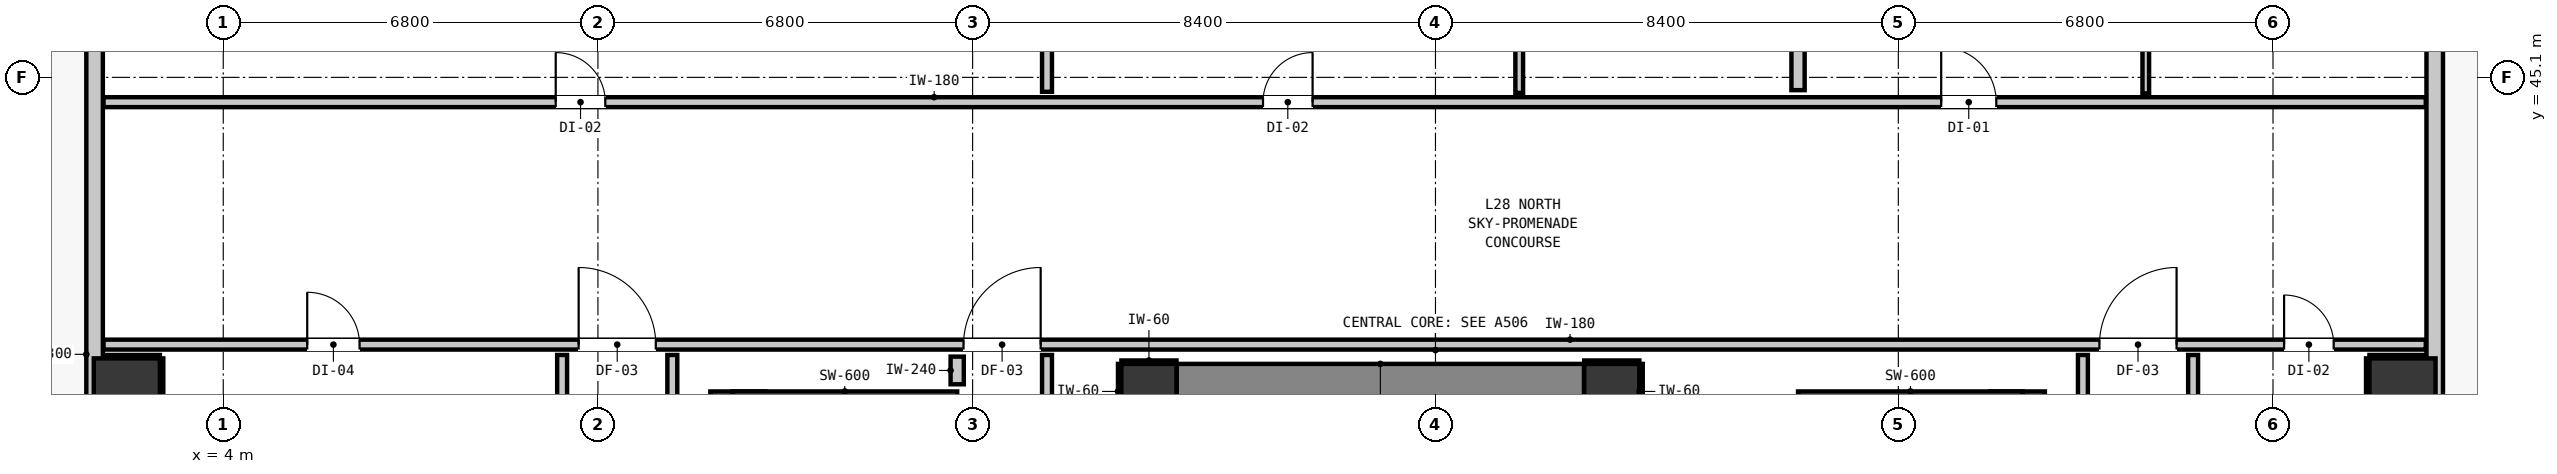
"""IFC4 building model, lengths in metres.
Left out: names, types, materials, properties, quantities, classifications, styles, units other than length and angle.
Written with IfcOpenShell. Run it as: python <this file> out.ifc"""

import sys

from ifc_helpers import new_model, si_unit, direction, frame, frame_2d, origin, origin_2d, place, context, subcontext, project, spatial, rectangle, extrude, element, fill, save


model = new_model("IFC4")
c1 = context("Model", 3, precision=1e-05, world=origin(), true_north=direction((0.0, 1.0)))
c2 = subcontext(c1, "Body", "Model", "MODEL_VIEW")
j1 = project(units=[si_unit("LENGTHUNIT", "METRE"), si_unit("PLANEANGLEUNIT", "RADIAN")], contexts=[c1])
p1 = place(None, origin())
s1 = spatial("IfcSite", under=j1, at=p1, CompositionType="ELEMENT")
p2 = place(p1, origin())
s2 = spatial("IfcBuilding", under=s1, at=p2, CompositionType="ELEMENT")
p3 = place(p2, frame((0.0, 0.0, 99.44)))
s3 = spatial("IfcBuildingStorey", under=s2, at=p3, CompositionType="ELEMENT", Elevation=99.44)
for number, where, z_axis, x_axis in (
    (1, (20.8, 39.4, 0.0), (0.0, 0.0, 1.0), (1.0, 0.0, 0.0)),
    (2, (29.2, 39.4, 0.0), (0.0, 0.0, 1.0), (1.0, 0.0, 0.0)),
):
    element("IfcColumn", number, at=place(p3, frame(where, z_axis=z_axis, x_axis=x_axis)), inside=s3, PredefinedType="COLUMN", context=c2, shape_type="SweptSolid", body=[
        extrude(rectangle(XDim=1.0, YDim=1.0, at=origin_2d()), origin(), (0.0, 0.0, 1.0), 3.32),
    ])
p4 = place(p3, frame((13.34, 31.205, 0.0), z_axis=(0.0, 0.0, 1.0), x_axis=(0.0, 1.0, 0.0)))
e3 = element("IfcWall", 3, at=p4, inside=s3, PredefinedType="SHEAR", context=c2, shape_type="SweptSolid", body=[
    extrude(rectangle(XDim=8.195, YDim=1.0, at=frame_2d((4.097, 0.0))), origin(), (0.0, 0.0, 1.0), 3.32),
])
p5 = place(p3, frame((13.24, 39.1, 0.0), z_axis=(0.0, 0.0, 1.0), x_axis=(1.0, 0.0, 0.0)))
e4 = element("IfcWall", 4, at=p5, inside=s3, PredefinedType="SHEAR", context=c2, shape_type="SweptSolid", body=[
    extrude(rectangle(XDim=4.08, YDim=0.6, at=frame_2d((2.04, 0.0))), origin(), (0.0, 0.0, 1.0), 3.32),
])
p6 = place(p3, frame((36.56, 31.205, 0.0), z_axis=(0.0, 0.0, 1.0), x_axis=(0.0, 1.0, 0.0)))
e5 = element("IfcWall", 5, at=p6, inside=s3, PredefinedType="SHEAR", context=c2, shape_type="SweptSolid", body=[
    extrude(rectangle(XDim=8.195, YDim=1.0, at=frame_2d((4.097, 0.0))), origin(), (0.0, 0.0, 1.0), 3.32),
])
p7 = place(p3, frame((32.58, 39.1, 0.0), z_axis=(0.0, 0.0, 1.0), x_axis=(1.0, 0.0, 0.0)))
e6 = element("IfcWall", 6, at=p7, inside=s3, PredefinedType="SHEAR", context=c2, shape_type="SweptSolid", body=[
    extrude(rectangle(XDim=4.08, YDim=0.6, at=frame_2d((2.04, 0.0))), origin(), (0.0, 0.0, 1.0), 3.32),
])
p8 = place(p3, frame((21.305, 39.4, 0.0), z_axis=(0.0, 0.0, 1.0), x_axis=(1.0, 0.0, 0.0)))
e7 = element("IfcWall", 7, at=p8, inside=s3, PredefinedType="SHEAR", context=c2, shape_type="SweptSolid", body=[
    extrude(rectangle(XDim=7.39, YDim=1.0, at=frame_2d((3.695, 0.0))), origin(), (0.0, 0.0, 1.0), 3.32),
])
for number, where, z_axis, x_axis in (
    (8, (2.25, 39.4, 0.0), (0.0, 0.0, 1.0), (1.0, 0.0, 0.0)),
    (9, (43.55, 39.4, 0.0), (0.0, 0.0, 1.0), (1.0, 0.0, 0.0)),
):
    element("IfcColumn", number, at=place(p3, frame(where, z_axis=z_axis, x_axis=x_axis)), inside=s3, PredefinedType="COLUMN", context=c2, shape_type="SweptSolid", body=[
        extrude(rectangle(XDim=1.2, YDim=1.2, at=origin_2d()), origin(), (0.0, 0.0, 1.0), 3.32),
    ])
p9 = place(p3, frame((1.665, 16.365, 0.0), z_axis=(0.0, 0.0, 1.0), x_axis=(0.0, 1.0, 0.0)))
e10 = element("IfcWall", 10, at=p9, inside=s3, PredefinedType="STANDARD", context=c2, shape_type="SweptSolid", body=[
    extrude(rectangle(XDim=34.67, YDim=0.3, at=frame_2d((17.335, 0.0))), origin(), (0.0, 0.0, 1.0), 3.06),
])
p10 = place(p9, frame((8.955, 0.0, 0.0)))
e11 = element("IfcOpeningElement", 11, at=p10, cuts=e10, PredefinedType="OPENING", context=c2, shape_type="SweptSolid", body=[
    extrude(rectangle(XDim=1.0, YDim=2.15, at=frame_2d((0.5, 1.075))), frame((0.0, 0.16, 0.0), z_axis=(0.0, -1.0, 0.0), x_axis=(1.0, 0.0, 0.0)), (0.0, 0.0, 1.0), 0.32),
])
p11 = place(p9, frame((31.033, 0.0, 0.85)))
e12 = element("IfcOpeningElement", 12, at=p11, cuts=e10, PredefinedType="OPENING", context=c2, shape_type="SweptSolid", body=[
    extrude(rectangle(XDim=0.9, YDim=1.5, at=frame_2d((0.45, 0.75))), frame((0.0, 0.16, 0.0), z_axis=(0.0, -1.0, 0.0), x_axis=(1.0, 0.0, 0.0)), (0.0, 0.0, 1.0), 0.32),
])
p12 = place(p9, frame((10.955, 0.0, 0.85)))
e13 = element("IfcOpeningElement", 13, at=p12, cuts=e10, PredefinedType="OPENING", context=c2, shape_type="SweptSolid", body=[
    extrude(rectangle(XDim=0.9, YDim=1.5, at=frame_2d((0.45, 0.75))), frame((0.0, 0.16, 0.0), z_axis=(0.0, -1.0, 0.0), x_axis=(1.0, 0.0, 0.0)), (0.0, 0.0, 1.0), 0.32),
])
p13 = place(p9, frame((15.485, 0.0, 0.85)))
e14 = element("IfcOpeningElement", 14, at=p13, cuts=e10, PredefinedType="OPENING", context=c2, shape_type="SweptSolid", body=[
    extrude(rectangle(XDim=0.9, YDim=1.5, at=frame_2d((0.45, 0.75))), frame((0.0, 0.16, 0.0), z_axis=(0.0, -1.0, 0.0), x_axis=(1.0, 0.0, 0.0)), (0.0, 0.0, 1.0), 0.32),
])
p14 = place(p3, frame((44.135, 51.035, 0.0), z_axis=(0.0, 0.0, 1.0), x_axis=(0.0, -1.0, 0.0)))
e15 = element("IfcWall", 15, at=p14, inside=s3, PredefinedType="STANDARD", context=c2, shape_type="SweptSolid", body=[
    extrude(rectangle(XDim=34.67, YDim=0.3, at=frame_2d((17.335, 0.0))), origin(), (0.0, 0.0, 1.0), 3.06),
])
p15 = place(p14, frame((0.901, 0.0, 0.0)))
e16 = element("IfcOpeningElement", 16, at=p15, cuts=e15, PredefinedType="OPENING", context=c2, shape_type="SweptSolid", body=[
    extrude(rectangle(XDim=1.0, YDim=2.15, at=frame_2d((0.5, 1.075))), frame((0.0, 0.16, 0.0), z_axis=(0.0, -1.0, 0.0), x_axis=(1.0, 0.0, 0.0)), (0.0, 0.0, 1.0), 0.32),
])
p16 = place(p14, frame((32.682, 0.0, 0.85)))
e17 = element("IfcOpeningElement", 17, at=p16, cuts=e15, PredefinedType="OPENING", context=c2, shape_type="SweptSolid", body=[
    extrude(rectangle(XDim=0.9, YDim=1.5, at=frame_2d((0.45, 0.75))), frame((0.0, 0.16, 0.0), z_axis=(0.0, -1.0, 0.0), x_axis=(1.0, 0.0, 0.0)), (0.0, 0.0, 1.0), 0.32),
])
p17 = place(p14, frame((23.323, 0.0, 0.85)))
e18 = element("IfcOpeningElement", 18, at=p17, cuts=e15, PredefinedType="OPENING", context=c2, shape_type="SweptSolid", body=[
    extrude(rectangle(XDim=0.9, YDim=1.5, at=frame_2d((0.45, 0.75))), frame((0.0, 0.16, 0.0), z_axis=(0.0, -1.0, 0.0), x_axis=(1.0, 0.0, 0.0)), (0.0, 0.0, 1.0), 0.32),
])
p18 = place(p3, frame((1.827, 40.25, 0.0), z_axis=(0.0, 0.0, 1.0), x_axis=(1.0, 0.0, 0.0)))
e19 = element("IfcWall", 19, at=p18, inside=s3, PredefinedType="PARTITIONING", context=c2, shape_type="SweptSolid", body=[
    extrude(rectangle(XDim=42.146, YDim=0.18, at=frame_2d((21.073, 0.0))), origin(), (0.0, 0.0, 1.0), 3.06),
])
p19 = place(p18, frame((15.608, 0.0, 0.0)))
e20 = element("IfcOpeningElement", 20, at=p19, cuts=e19, PredefinedType="OPENING", context=c2, shape_type="SweptSolid", body=[
    extrude(rectangle(XDim=1.4, YDim=2.15, at=frame_2d((0.7, 1.075))), frame((0.0, 0.1, 0.0), z_axis=(0.0, -1.0, 0.0), x_axis=(1.0, 0.0, 0.0)), (0.0, 0.0, 1.0), 0.2),
])
p20 = place(p18, frame((8.623, 0.0, 0.0)))
e21 = element("IfcOpeningElement", 21, at=p20, cuts=e19, PredefinedType="OPENING", context=c2, shape_type="SweptSolid", body=[
    extrude(rectangle(XDim=1.4, YDim=2.15, at=frame_2d((0.7, 1.075))), frame((0.0, 0.1, 0.0), z_axis=(0.0, -1.0, 0.0), x_axis=(1.0, 0.0, 0.0)), (0.0, 0.0, 1.0), 0.2),
])
p21 = place(p18, frame((36.223, 0.0, 0.0)))
e22 = element("IfcOpeningElement", 22, at=p21, cuts=e19, PredefinedType="OPENING", context=c2, shape_type="SweptSolid", body=[
    extrude(rectangle(XDim=1.4, YDim=2.15, at=frame_2d((0.7, 1.075))), frame((0.0, 0.1, 0.0), z_axis=(0.0, -1.0, 0.0), x_axis=(1.0, 0.0, 0.0)), (0.0, 0.0, 1.0), 0.2),
])
p22 = place(p18, frame((3.697, 0.0, 0.0)))
e23 = element("IfcOpeningElement", 23, at=p22, cuts=e19, PredefinedType="OPENING", context=c2, shape_type="SweptSolid", body=[
    extrude(rectangle(XDim=0.95, YDim=2.1, at=frame_2d((0.475, 1.05))), frame((0.0, 0.1, 0.0), z_axis=(0.0, -1.0, 0.0), x_axis=(1.0, 0.0, 0.0)), (0.0, 0.0, 1.0), 0.2),
])
p23 = place(p18, frame((39.574, 0.0, 0.0)))
e24 = element("IfcOpeningElement", 24, at=p23, cuts=e19, PredefinedType="OPENING", context=c2, shape_type="SweptSolid", body=[
    extrude(rectangle(XDim=0.9, YDim=2.1, at=frame_2d((0.45, 1.05))), frame((0.0, 0.1, 0.0), z_axis=(0.0, -1.0, 0.0), x_axis=(1.0, 0.0, 0.0)), (0.0, 0.0, 1.0), 0.2),
])
p24 = place(p3, frame((1.827, 44.65, 0.0), z_axis=(0.0, 0.0, 1.0), x_axis=(1.0, 0.0, 0.0)))
e25 = element("IfcWall", 25, at=p24, inside=s3, PredefinedType="PARTITIONING", context=c2, shape_type="SweptSolid", body=[
    extrude(rectangle(XDim=42.146, YDim=0.18, at=frame_2d((21.073, 0.0))), origin(), (0.0, 0.0, 1.0), 3.06),
])
p25 = place(p24, frame((8.207, 0.0, 0.0)))
e26 = element("IfcOpeningElement", 26, at=p25, cuts=e25, PredefinedType="OPENING", context=c2, shape_type="SweptSolid", body=[
    extrude(rectangle(XDim=0.9, YDim=2.1, at=frame_2d((0.45, 1.05))), frame((0.0, 0.1, 0.0), z_axis=(0.0, -1.0, 0.0), x_axis=(1.0, 0.0, 0.0)), (0.0, 0.0, 1.0), 0.2),
])
p26 = place(p24, frame((21.043, 0.0, 0.0)))
e27 = element("IfcOpeningElement", 27, at=p26, cuts=e25, PredefinedType="OPENING", context=c2, shape_type="SweptSolid", body=[
    extrude(rectangle(XDim=0.9, YDim=2.1, at=frame_2d((0.45, 1.05))), frame((0.0, 0.1, 0.0), z_axis=(0.0, -1.0, 0.0), x_axis=(1.0, 0.0, 0.0)), (0.0, 0.0, 1.0), 0.2),
])
p27 = place(p24, frame((33.351, 0.0, 0.0)))
e28 = element("IfcOpeningElement", 28, at=p27, cuts=e25, PredefinedType="OPENING", context=c2, shape_type="SweptSolid", body=[
    extrude(rectangle(XDim=1.0, YDim=2.15, at=frame_2d((0.5, 1.075))), frame((0.0, 0.1, 0.0), z_axis=(0.0, -1.0, 0.0), x_axis=(1.0, 0.0, 0.0)), (0.0, 0.0, 1.0), 0.2),
])
p28 = place(p3, frame((17.32, 39.53, 0.0), z_axis=(0.0, 0.0, 1.0), x_axis=(0.0, 1.0, 0.0)))
e29 = element("IfcWall", 29, at=p28, inside=s3, PredefinedType="PARTITIONING", context=c2, shape_type="SweptSolid", body=[
    extrude(rectangle(XDim=0.502, YDim=0.24, at=frame_2d((0.251, 0.0))), origin(), (0.0, 0.0, 1.0), 3.06),
])
p29 = place(p3, frame((32.58, 44.868, 0.0), z_axis=(0.0, 0.0, 1.0), x_axis=(0.0, 1.0, 0.0)))
e30 = element("IfcWall", 30, at=p29, inside=s3, PredefinedType="PARTITIONING", context=c2, shape_type="SweptSolid", body=[
    extrude(rectangle(XDim=3.421, YDim=0.24, at=frame_2d((1.71, 0.0))), origin(), (0.0, 0.0, 1.0), 3.06),
])
p30 = place(p29, frame((1.246, 0.0, 0.0)))
e31 = element("IfcOpeningElement", 31, at=p30, cuts=e30, PredefinedType="OPENING", context=c2, shape_type="SweptSolid", body=[
    extrude(rectangle(XDim=0.86, YDim=2.02, at=frame_2d((0.43, 1.01))), frame((0.0, 0.13, 0.0), z_axis=(0.0, -1.0, 0.0), x_axis=(1.0, 0.0, 0.0)), (0.0, 0.0, 1.0), 0.26),
])
p31 = place(p3, frame((10.15, 36.818, 0.0), z_axis=(0.0, 0.0, 1.0), x_axis=(0.0, 1.0, 0.0)))
e32 = element("IfcWall", 32, at=p31, inside=s3, PredefinedType="PARTITIONING", context=c2, shape_type="SweptSolid", body=[
    extrude(rectangle(XDim=3.244, YDim=0.18, at=frame_2d((1.622, 0.0))), origin(), (0.0, 0.0, 1.0), 3.06),
])
p32 = place(p3, frame((12.15, 21.368, 0.0), z_axis=(0.0, 0.0, 1.0), x_axis=(0.0, 1.0, 0.0)))
e33 = element("IfcWall", 33, at=p32, inside=s3, PredefinedType="PARTITIONING", context=c2, shape_type="SweptSolid", body=[
    extrude(rectangle(XDim=18.694, YDim=0.18, at=frame_2d((9.347, 0.0))), origin(), (0.0, 0.0, 1.0), 3.06),
])
p33 = place(p3, frame((18.95, 39.058, 0.0), z_axis=(0.0, 0.0, 1.0), x_axis=(0.0, 1.0, 0.0)))
e34 = element("IfcWall", 34, at=p33, inside=s3, PredefinedType="PARTITIONING", context=c2, shape_type="SweptSolid", body=[
    extrude(rectangle(XDim=1.004, YDim=0.18, at=frame_2d((0.502, 0.0))), origin(), (0.0, 0.0, 1.0), 3.06),
])
p34 = place(p3, frame((18.95, 44.838, 0.0), z_axis=(0.0, 0.0, 1.0), x_axis=(0.0, 1.0, 0.0)))
e35 = element("IfcWall", 35, at=p34, inside=s3, PredefinedType="PARTITIONING", context=c2, shape_type="SweptSolid", body=[
    extrude(rectangle(XDim=8.535, YDim=0.18, at=frame_2d((4.268, 0.0))), origin(), (0.0, 0.0, 1.0), 3.06),
])
p35 = place(p3, frame((37.75, 21.368, 0.0), z_axis=(0.0, 0.0, 1.0), x_axis=(0.0, 1.0, 0.0)))
e36 = element("IfcWall", 36, at=p35, inside=s3, PredefinedType="PARTITIONING", context=c2, shape_type="SweptSolid", body=[
    extrude(rectangle(XDim=18.694, YDim=0.18, at=frame_2d((9.347, 0.0))), origin(), (0.0, 0.0, 1.0), 3.06),
])
p36 = place(p3, frame((39.75, 34.158, 0.0), z_axis=(0.0, 0.0, 1.0), x_axis=(0.0, 1.0, 0.0)))
e37 = element("IfcWall", 37, at=p36, inside=s3, PredefinedType="PARTITIONING", context=c2, shape_type="SweptSolid", body=[
    extrude(rectangle(XDim=5.904, YDim=0.18, at=frame_2d((2.952, 0.0))), origin(), (0.0, 0.0, 1.0), 3.06),
])
p37 = place(p3, frame((27.52, 44.818, 0.0), z_axis=(0.0, 0.0, 1.0), x_axis=(0.0, 1.0, 0.0)))
e38 = element("IfcWall", 38, at=p37, inside=s3, PredefinedType="PARTITIONING", context=c2, shape_type="SweptSolid", body=[
    extrude(rectangle(XDim=3.447, YDim=0.14, at=frame_2d((1.723, 0.0))), origin(), (0.0, 0.0, 1.0), 3.06),
])
p38 = place(p3, frame((38.891, 44.808, 0.0), z_axis=(0.0, 0.0, 1.0), x_axis=(0.0, 1.0, 0.0)))
e39 = element("IfcWall", 39, at=p38, inside=s3, PredefinedType="PARTITIONING", context=c2, shape_type="SweptSolid", body=[
    extrude(rectangle(XDim=3.467, YDim=0.12, at=frame_2d((1.733, 0.0))), origin(), (0.0, 0.0, 1.0), 2.445),
])
p39 = place(p38, frame((1.286, 0.0, 0.0)))
e40 = element("IfcOpeningElement", 40, at=p39, cuts=e39, PredefinedType="OPENING", context=c2, shape_type="SweptSolid", body=[
    extrude(rectangle(XDim=0.9, YDim=2.1, at=frame_2d((0.45, 1.05))), frame((0.0, 0.07, 0.0), z_axis=(0.0, -1.0, 0.0), x_axis=(1.0, 0.0, 0.0)), (0.0, 0.0, 1.0), 0.14),
])
for number, where, z_axis, x_axis in (
    (41, (20.3, 39.932, 0.0), (0.0, 0.0, 1.0), (1.0, 0.0, 0.0)),
    (42, (20.268, 38.9, 0.0), (0.0, 0.0, 1.0), (0.0, 1.0, 0.0)),
    (43, (28.7, 39.932, 0.0), (0.0, 0.0, 1.0), (1.0, 0.0, 0.0)),
    (44, (29.732, 38.9, 0.0), (0.0, 0.0, 1.0), (0.0, 1.0, 0.0)),
):
    element("IfcWall", number, at=place(p3, frame(where, z_axis=z_axis, x_axis=x_axis)), inside=s3, PredefinedType="PARTITIONING", context=c2, shape_type="SweptSolid", body=[
        extrude(rectangle(XDim=1.0, YDim=0.06, at=frame_2d((0.5, 0.0))), origin(), (0.0, 0.0, 1.0), 1.45),
    ])
p40 = place(p3, frame((1.83, 40.032, 0.0), z_axis=(0.0, 0.0, 1.0), x_axis=(1.0, 0.0, 0.0)))
e45 = element("IfcWall", 45, at=p40, inside=s3, PredefinedType="PARTITIONING", context=c2, shape_type="SweptSolid", body=[
    extrude(rectangle(XDim=1.02, YDim=0.06, at=frame_2d((0.51, 0.0))), origin(), (0.0, 0.0, 1.0), 1.45),
])
p41 = place(p3, frame((2.882, 38.8, 0.0), z_axis=(0.0, 0.0, 1.0), x_axis=(0.0, 1.0, 0.0)))
e46 = element("IfcWall", 46, at=p41, inside=s3, PredefinedType="PARTITIONING", context=c2, shape_type="SweptSolid", body=[
    extrude(rectangle(XDim=1.2, YDim=0.06, at=frame_2d((0.6, 0.0))), origin(), (0.0, 0.0, 1.0), 1.45),
])
p42 = place(p3, frame((42.95, 40.032, 0.0), z_axis=(0.0, 0.0, 1.0), x_axis=(1.0, 0.0, 0.0)))
e47 = element("IfcWall", 47, at=p42, inside=s3, PredefinedType="PARTITIONING", context=c2, shape_type="SweptSolid", body=[
    extrude(rectangle(XDim=1.02, YDim=0.06, at=frame_2d((0.51, 0.0))), origin(), (0.0, 0.0, 1.0), 1.45),
])
p43 = place(p3, frame((42.918, 38.8, 0.0), z_axis=(0.0, 0.0, 1.0), x_axis=(0.0, 1.0, 0.0)))
e48 = element("IfcWall", 48, at=p43, inside=s3, PredefinedType="PARTITIONING", context=c2, shape_type="SweptSolid", body=[
    extrude(rectangle(XDim=1.2, YDim=0.06, at=frame_2d((0.6, 0.0))), origin(), (0.0, 0.0, 1.0), 1.45),
])
p44 = place(p19, origin())
e49 = element("IfcDoor", 49, at=p44, inside=s3, OperationType="SINGLE_SWING_RIGHT", PredefinedType="DOOR", context=c2, shape_type="SweptSolid", body=[
    extrude(rectangle(XDim=1.4, YDim=2.15, at=frame_2d((0.7, 1.075))), frame((0.0, 0.025, 0.0), z_axis=(0.0, -1.0, 0.0), x_axis=(1.0, 0.0, 0.0)), (0.0, 0.0, 1.0), 0.05),
])
fill(e20, e49)
p45 = place(p20, origin())
e50 = element("IfcDoor", 50, at=p45, inside=s3, OperationType="SINGLE_SWING_LEFT", PredefinedType="DOOR", context=c2, shape_type="SweptSolid", body=[
    extrude(rectangle(XDim=1.4, YDim=2.15, at=frame_2d((0.7, 1.075))), frame((0.0, 0.025, 0.0), z_axis=(0.0, -1.0, 0.0), x_axis=(1.0, 0.0, 0.0)), (0.0, 0.0, 1.0), 0.05),
])
fill(e21, e50)
p46 = place(p21, origin())
e51 = element("IfcDoor", 51, at=p46, inside=s3, OperationType="SINGLE_SWING_RIGHT", PredefinedType="DOOR", context=c2, shape_type="SweptSolid", body=[
    extrude(rectangle(XDim=1.4, YDim=2.15, at=frame_2d((0.7, 1.075))), frame((0.0, 0.025, 0.0), z_axis=(0.0, -1.0, 0.0), x_axis=(1.0, 0.0, 0.0)), (0.0, 0.0, 1.0), 0.05),
])
fill(e22, e51)
p47 = place(p25, origin())
e52 = element("IfcDoor", 52, at=p47, inside=s3, OperationType="SINGLE_SWING_LEFT", PredefinedType="DOOR", context=c2, shape_type="SweptSolid", body=[
    extrude(rectangle(XDim=0.9, YDim=2.1, at=frame_2d((0.45, 1.05))), frame((0.0, 0.025, 0.0), z_axis=(0.0, -1.0, 0.0), x_axis=(1.0, 0.0, 0.0)), (0.0, 0.0, 1.0), 0.05),
])
fill(e26, e52)
p48 = place(p26, origin())
e53 = element("IfcDoor", 53, at=p48, inside=s3, OperationType="SINGLE_SWING_RIGHT", PredefinedType="DOOR", context=c2, shape_type="SweptSolid", body=[
    extrude(rectangle(XDim=0.9, YDim=2.1, at=frame_2d((0.45, 1.05))), frame((0.0, 0.025, 0.0), z_axis=(0.0, -1.0, 0.0), x_axis=(1.0, 0.0, 0.0)), (0.0, 0.0, 1.0), 0.05),
])
fill(e27, e53)
p49 = place(p27, origin())
e54 = element("IfcDoor", 54, at=p49, inside=s3, OperationType="SINGLE_SWING_LEFT", PredefinedType="DOOR", context=c2, shape_type="SweptSolid", body=[
    extrude(rectangle(XDim=1.0, YDim=2.15, at=frame_2d((0.5, 1.075))), frame((0.0, 0.025, 0.0), z_axis=(0.0, -1.0, 0.0), x_axis=(1.0, 0.0, 0.0)), (0.0, 0.0, 1.0), 0.05),
])
fill(e28, e54)
p50 = place(p22, origin())
e55 = element("IfcDoor", 55, at=p50, inside=s3, OperationType="SINGLE_SWING_LEFT", PredefinedType="DOOR", context=c2, shape_type="SweptSolid", body=[
    extrude(rectangle(XDim=0.95, YDim=2.1, at=frame_2d((0.475, 1.05))), frame((0.0, 0.025, 0.0), z_axis=(0.0, -1.0, 0.0), x_axis=(1.0, 0.0, 0.0)), (0.0, 0.0, 1.0), 0.05),
])
fill(e23, e55)
p51 = place(p23, origin())
e56 = element("IfcDoor", 56, at=p51, inside=s3, OperationType="SINGLE_SWING_LEFT", PredefinedType="DOOR", context=c2, shape_type="SweptSolid", body=[
    extrude(rectangle(XDim=0.9, YDim=2.1, at=frame_2d((0.45, 1.05))), frame((0.0, 0.025, 0.0), z_axis=(0.0, -1.0, 0.0), x_axis=(1.0, 0.0, 0.0)), (0.0, 0.0, 1.0), 0.05),
])
fill(e24, e56)
save(model, sys.argv[1])
